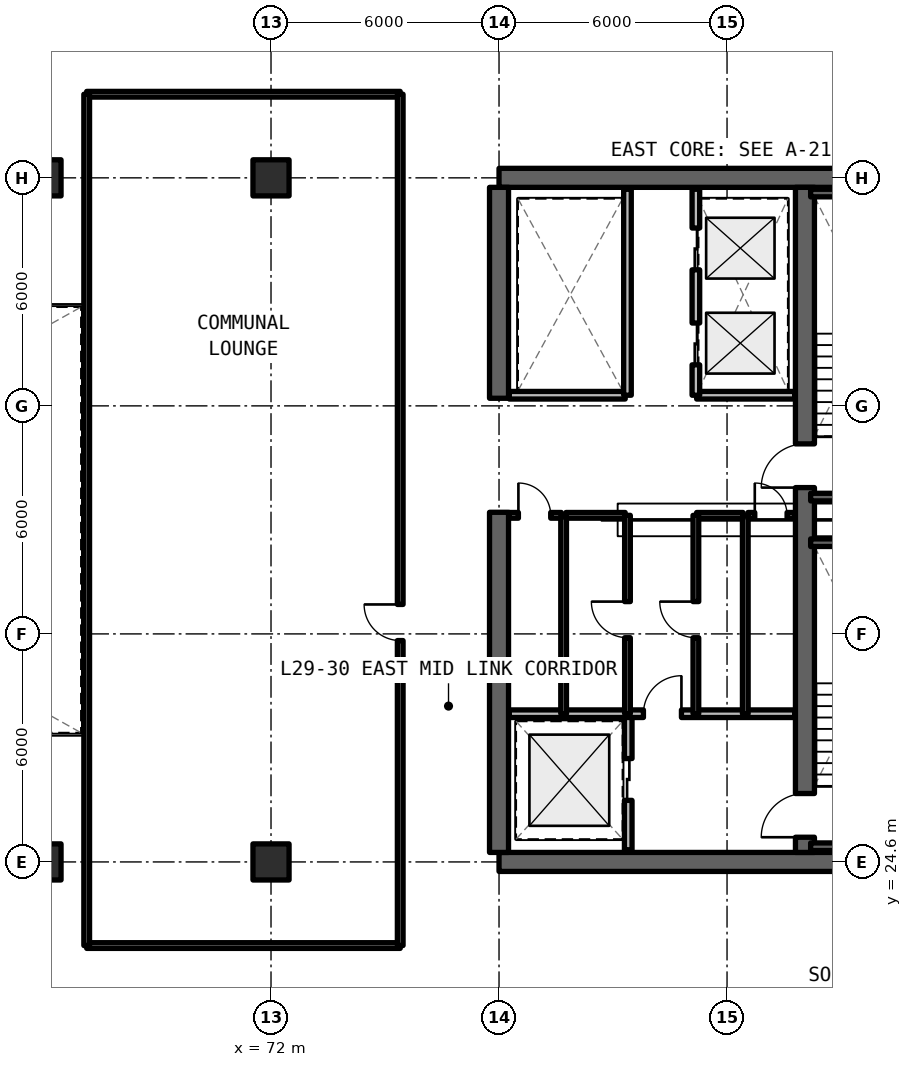
"""IFC4 building model, lengths in metres.
Left out: names, types, materials, properties, quantities, classifications, styles, units other than length and angle.
Written with IfcOpenShell. Run it as: python <this file> out.ifc"""

import sys

from ifc_helpers import new_model, si_unit, direction, frame, frame_2d, origin, origin_2d, place, context, subcontext, project, spatial, rectangle, extrude, element, fill, save


model = new_model("IFC4")
c1 = context("Model", 3, precision=1e-05, world=origin(), true_north=direction((0.0, 1.0)))
c2 = subcontext(c1, "Body", "Model", "MODEL_VIEW")
j1 = project(units=[si_unit("LENGTHUNIT", "METRE"), si_unit("PLANEANGLEUNIT", "RADIAN")], contexts=[c1])
p1 = place(None, origin())
s1 = spatial("IfcSite", under=j1, at=p1, CompositionType="ELEMENT")
p2 = place(p1, origin())
s2 = spatial("IfcBuilding", under=s1, at=p2, CompositionType="ELEMENT")
p3 = place(p2, frame((0.0, 0.0, 105.27)))
s3 = spatial("IfcBuildingStorey", under=s2, at=p3, CompositionType="ELEMENT", Elevation=105.27)
for number, where, z_axis, x_axis in (
    (1, (78.0, 24.6, 0.0), (0.0, 0.0, 1.0), (1.0, 0.0, 0.0)),
    (2, (90.0, 42.6, 0.0), (0.0, 0.0, 1.0), (-1.0, 0.0, 0.0)),
):
    element("IfcWall", number, at=place(p3, frame(where, z_axis=z_axis, x_axis=x_axis)), inside=s3, PredefinedType="SHEAR", context=c2, shape_type="SweptSolid", body=[
        extrude(rectangle(XDim=12.0, YDim=0.5, at=frame_2d((6.0, 0.0))), origin(), (0.0, 0.0, 1.0), 3.3),
    ])
p4 = place(p3, frame((78.0, 24.85, 0.0), z_axis=(0.0, 0.0, 1.0), x_axis=(0.0, 1.0, 0.0)))
e3 = element("IfcWall", 3, at=p4, inside=s3, PredefinedType="SHEAR", context=c2, shape_type="SweptSolid", body=[
    extrude(rectangle(XDim=8.95, YDim=0.5, at=frame_2d((4.475, 0.0))), origin(), (0.0, 0.0, 1.0), 3.3),
])
p5 = place(p3, frame((78.0, 36.8, 0.0), z_axis=(0.0, 0.0, 1.0), x_axis=(0.0, 1.0, 0.0)))
e4 = element("IfcWall", 4, at=p5, inside=s3, PredefinedType="SHEAR", context=c2, shape_type="SweptSolid", body=[
    extrude(rectangle(XDim=5.55, YDim=0.5, at=frame_2d((2.775, 0.0))), origin(), (0.0, 0.0, 1.0), 3.3),
])
p6 = place(p3, frame((86.05, 24.85, 0.0), z_axis=(0.0, 0.0, 1.0), x_axis=(0.0, 1.0, 0.0)))
e5 = element("IfcWall", 5, at=p6, inside=s3, PredefinedType="SHEAR", context=c2, shape_type="SweptSolid", body=[
    extrude(rectangle(XDim=17.5, YDim=0.5, at=frame_2d((8.75, 0.0))), origin(), (0.0, 0.0, 1.0), 3.3),
])
p7 = place(p6, frame((0.4, 0.0, 0.0)))
e6 = element("IfcOpeningElement", 6, at=p7, cuts=e5, PredefinedType="OPENING", context=c2, shape_type="SweptSolid", body=[
    extrude(rectangle(XDim=1.15, YDim=2.15, at=frame_2d((0.575, 1.075))), frame((0.0, 0.26, 0.0), z_axis=(0.0, -1.0, 0.0), x_axis=(1.0, 0.0, 0.0)), (0.0, 0.0, 1.0), 0.52),
])
p8 = place(p6, frame((9.6, 0.0, 0.0)))
e7 = element("IfcOpeningElement", 7, at=p8, cuts=e5, PredefinedType="OPENING", context=c2, shape_type="SweptSolid", body=[
    extrude(rectangle(XDim=1.15, YDim=2.15, at=frame_2d((0.575, 1.075))), frame((0.0, 0.26, 0.0), z_axis=(0.0, -1.0, 0.0), x_axis=(1.0, 0.0, 0.0)), (0.0, 0.0, 1.0), 0.52),
])
for number, where, z_axis, x_axis in (
    (8, (66.0, 24.6, 0.0), (0.0, 0.0, 1.0), (1.0, 0.0, 0.0)),
    (9, (66.0, 42.6, 0.0), (0.0, 0.0, 1.0), (1.0, 0.0, 0.0)),
    (10, (72.0, 24.6, 0.0), (0.0, 0.0, 1.0), (1.0, 0.0, 0.0)),
    (11, (72.0, 42.6, 0.0), (0.0, 0.0, 1.0), (1.0, 0.0, 0.0)),
):
    element("IfcColumn", number, at=place(p3, frame(where, z_axis=z_axis, x_axis=x_axis)), inside=s3, PredefinedType="COLUMN", context=c2, shape_type="SweptSolid", body=[
        extrude(rectangle(XDim=0.95, YDim=0.95, at=origin_2d()), origin(), (0.0, 0.0, 1.0), 3.3),
    ])
p9 = place(p3, frame((81.4, 24.92, 0.0), z_axis=(0.0, 0.0, 1.0), x_axis=(0.0, 1.0, 0.0)))
e12 = element("IfcWall", 12, at=p9, inside=s3, PredefinedType="SOLIDWALL", context=c2, shape_type="SweptSolid", body=[
    extrude(rectangle(XDim=3.58, YDim=0.2, at=frame_2d((1.79, 0.0))), origin(), (0.0, 0.0, 1.0), 2.35),
])
p10 = place(p9, frame((1.3, 0.0, 0.0)))
e13 = element("IfcOpeningElement", 13, at=p10, cuts=e12, PredefinedType="OPENING", context=c2, shape_type="SweptSolid", body=[
    extrude(rectangle(XDim=1.1, YDim=2.2, at=frame_2d((0.55, 1.1))), frame((0.0, 0.11, 0.0), z_axis=(0.0, -1.0, 0.0), x_axis=(1.0, 0.0, 0.0)), (0.0, 0.0, 1.0), 0.22),
])
p11 = place(p3, frame((78.27, 28.5, 0.0), z_axis=(0.0, 0.0, 1.0), x_axis=(1.0, 0.0, 0.0)))
e14 = element("IfcWall", 14, at=p11, inside=s3, PredefinedType="SOLIDWALL", context=c2, shape_type="SweptSolid", body=[
    extrude(rectangle(XDim=7.51, YDim=0.2, at=frame_2d((3.755, 0.0))), origin(), (0.0, 0.0, 1.0), 2.35),
])
p12 = place(p11, frame((3.53, 0.0, 0.0)))
e15 = element("IfcOpeningElement", 15, at=p12, cuts=e14, PredefinedType="OPENING", context=c2, shape_type="SweptSolid", body=[
    extrude(rectangle(XDim=1.0, YDim=2.15, at=frame_2d((0.5, 1.075))), frame((0.0, 0.11, 0.0), z_axis=(0.0, -1.0, 0.0), x_axis=(1.0, 0.0, 0.0)), (0.0, 0.0, 1.0), 0.22),
])
p13 = place(p3, frame((84.48, 28.5, 0.0), z_axis=(0.0, 0.0, 1.0), x_axis=(0.0, 1.0, 0.0)))
e16 = element("IfcWall", 16, at=p13, inside=s3, PredefinedType="SOLIDWALL", context=c2, shape_type="SweptSolid", body=[
    extrude(rectangle(XDim=5.22, YDim=0.15, at=frame_2d((2.61, 0.0))), origin(), (0.0, 0.0, 1.0), 2.35),
])
p14 = place(p3, frame((84.55, 33.72, 0.0), z_axis=(0.0, 0.0, 1.0), x_axis=(1.0, 0.0, 0.0)))
e17 = element("IfcWall", 17, at=p14, inside=s3, PredefinedType="SOLIDWALL", context=c2, shape_type="SweptSolid", body=[
    extrude(rectangle(XDim=1.23, YDim=0.15, at=frame_2d((0.615, 0.0))), origin(), (0.0, 0.0, 1.0), 2.35),
])
p15 = place(p14, frame((0.18, 0.0, 0.0)))
e18 = element("IfcOpeningElement", 18, at=p15, cuts=e17, PredefinedType="OPENING", context=c2, shape_type="SweptSolid", body=[
    extrude(rectangle(XDim=0.85, YDim=2.1, at=frame_2d((0.425, 1.05))), frame((0.0, 0.085, 0.0), z_axis=(0.0, -1.0, 0.0), x_axis=(1.0, 0.0, 0.0)), (0.0, 0.0, 1.0), 0.17),
])
p16 = place(p3, frame((83.2, 33.72, 0.0), z_axis=(0.0, 0.0, 1.0), x_axis=(1.0, 0.0, 0.0)))
e19 = element("IfcWall", 19, at=p16, inside=s3, PredefinedType="SOLIDWALL", context=c2, shape_type="SweptSolid", body=[
    extrude(rectangle(XDim=1.22, YDim=0.15, at=frame_2d((0.61, 0.0))), origin(), (0.0, 0.0, 1.0), 2.35),
])
p17 = place(p3, frame((83.18, 28.5, 0.0), z_axis=(0.0, 0.0, 1.0), x_axis=(0.0, 1.0, 0.0)))
e20 = element("IfcWall", 20, at=p17, inside=s3, PredefinedType="SOLIDWALL", context=c2, shape_type="SweptSolid", body=[
    extrude(rectangle(XDim=5.22, YDim=0.15, at=frame_2d((2.61, 0.0))), origin(), (0.0, 0.0, 1.0), 2.35),
])
p18 = place(p17, frame((2.0, 0.0, 0.0)))
e21 = element("IfcOpeningElement", 21, at=p18, cuts=e20, PredefinedType="OPENING", context=c2, shape_type="SweptSolid", body=[
    extrude(rectangle(XDim=0.95, YDim=2.15, at=frame_2d((0.475, 1.075))), frame((0.0, 0.085, 0.0), z_axis=(0.0, -1.0, 0.0), x_axis=(1.0, 0.0, 0.0)), (0.0, 0.0, 1.0), 0.17),
])
p19 = place(p3, frame((79.7, 28.5, 0.0), z_axis=(0.0, 0.0, 1.0), x_axis=(0.0, 1.0, 0.0)))
e22 = element("IfcWall", 22, at=p19, inside=s3, PredefinedType="SOLIDWALL", context=c2, shape_type="SweptSolid", body=[
    extrude(rectangle(XDim=5.22, YDim=0.15, at=frame_2d((2.61, 0.0))), origin(), (0.0, 0.0, 1.0), 2.35),
])
p20 = place(p3, frame((79.76, 33.72, 0.0), z_axis=(0.0, 0.0, 1.0), x_axis=(1.0, 0.0, 0.0)))
e23 = element("IfcWall", 23, at=p20, inside=s3, PredefinedType="SOLIDWALL", context=c2, shape_type="SweptSolid", body=[
    extrude(rectangle(XDim=1.56, YDim=0.15, at=frame_2d((0.78, 0.0))), origin(), (0.0, 0.0, 1.0), 2.35),
])
p21 = place(p3, frame((78.27, 33.72, 0.0), z_axis=(0.0, 0.0, 1.0), x_axis=(1.0, 0.0, 0.0)))
e24 = element("IfcWall", 24, at=p21, inside=s3, PredefinedType="SOLIDWALL", context=c2, shape_type="SweptSolid", body=[
    extrude(rectangle(XDim=1.37, YDim=0.15, at=frame_2d((0.685, 0.0))), origin(), (0.0, 0.0, 1.0), 2.35),
])
p22 = place(p21, frame((0.24, 0.0, 0.0)))
e25 = element("IfcOpeningElement", 25, at=p22, cuts=e24, PredefinedType="OPENING", context=c2, shape_type="SweptSolid", body=[
    extrude(rectangle(XDim=0.85, YDim=2.1, at=frame_2d((0.425, 1.05))), frame((0.0, 0.085, 0.0), z_axis=(0.0, -1.0, 0.0), x_axis=(1.0, 0.0, 0.0)), (0.0, 0.0, 1.0), 0.17),
])
p23 = place(p3, frame((81.38, 28.5, 0.0), z_axis=(0.0, 0.0, 1.0), x_axis=(0.0, 1.0, 0.0)))
e26 = element("IfcWall", 26, at=p23, inside=s3, PredefinedType="SOLIDWALL", context=c2, shape_type="SweptSolid", body=[
    extrude(rectangle(XDim=5.22, YDim=0.15, at=frame_2d((2.61, 0.0))), origin(), (0.0, 0.0, 1.0), 2.35),
])
p24 = place(p23, frame((2.0, 0.0, 0.0)))
e27 = element("IfcOpeningElement", 27, at=p24, cuts=e26, PredefinedType="OPENING", context=c2, shape_type="SweptSolid", body=[
    extrude(rectangle(XDim=0.95, YDim=2.15, at=frame_2d((0.475, 1.075))), frame((0.0, 0.085, 0.0), z_axis=(0.0, -1.0, 0.0), x_axis=(1.0, 0.0, 0.0)), (0.0, 0.0, 1.0), 0.17),
])
p25 = place(p3, frame((83.2, 36.88, 0.0), z_axis=(0.0, 0.0, 1.0), x_axis=(1.0, 0.0, 0.0)))
e28 = element("IfcWall", 28, at=p25, inside=s3, PredefinedType="SOLIDWALL", context=c2, shape_type="SweptSolid", body=[
    extrude(rectangle(XDim=2.58, YDim=0.2, at=frame_2d((1.29, 0.0))), origin(), (0.0, 0.0, 1.0), 2.35),
])
p26 = place(p3, frame((83.18, 36.88, 0.0), z_axis=(0.0, 0.0, 1.0), x_axis=(0.0, 1.0, 0.0)))
e29 = element("IfcWall", 29, at=p26, inside=s3, PredefinedType="SOLIDWALL", context=c2, shape_type="SweptSolid", body=[
    extrude(rectangle(XDim=5.42, YDim=0.2, at=frame_2d((2.71, 0.0))), origin(), (0.0, 0.0, 1.0), 2.35),
])
p27 = place(p26, frame((0.8, 0.0, 0.0)))
e30 = element("IfcOpeningElement", 30, at=p27, cuts=e29, PredefinedType="OPENING", context=c2, shape_type="SweptSolid", body=[
    extrude(rectangle(XDim=1.1, YDim=2.2, at=frame_2d((0.55, 1.1))), frame((0.0, 0.11, 0.0), z_axis=(0.0, -1.0, 0.0), x_axis=(1.0, 0.0, 0.0)), (0.0, 0.0, 1.0), 0.22),
])
p28 = place(p26, frame((3.3, 0.0, 0.0)))
e31 = element("IfcOpeningElement", 31, at=p28, cuts=e29, PredefinedType="OPENING", context=c2, shape_type="SweptSolid", body=[
    extrude(rectangle(XDim=1.1, YDim=2.2, at=frame_2d((0.55, 1.1))), frame((0.0, 0.11, 0.0), z_axis=(0.0, -1.0, 0.0), x_axis=(1.0, 0.0, 0.0)), (0.0, 0.0, 1.0), 0.22),
])
p29 = place(p3, frame((78.27, 36.88, 0.0), z_axis=(0.0, 0.0, 1.0), x_axis=(1.0, 0.0, 0.0)))
e32 = element("IfcWall", 32, at=p29, inside=s3, PredefinedType="SOLIDWALL", context=c2, shape_type="SweptSolid", body=[
    extrude(rectangle(XDim=3.05, YDim=0.2, at=frame_2d((1.525, 0.0))), origin(), (0.0, 0.0, 1.0), 2.35),
])
p30 = place(p3, frame((81.38, 36.88, 0.0), z_axis=(0.0, 0.0, 1.0), x_axis=(0.0, 1.0, 0.0)))
e33 = element("IfcWall", 33, at=p30, inside=s3, PredefinedType="SOLIDWALL", context=c2, shape_type="SweptSolid", body=[
    extrude(rectangle(XDim=5.42, YDim=0.2, at=frame_2d((2.71, 0.0))), origin(), (0.0, 0.0, 1.0), 2.35),
])
for number, where, z_axis, x_axis in (
    (34, (67.15, 22.4, 0.0), (0.0, 0.0, 1.0), (1.0, 0.0, 0.0)),
    (35, (67.15, 44.8, 0.0), (0.0, 0.0, 1.0), (1.0, 0.0, 0.0)),
):
    element("IfcWall", number, at=place(p3, frame(where, z_axis=z_axis, x_axis=x_axis)), inside=s3, PredefinedType="SOLIDWALL", context=c2, shape_type="SweptSolid", body=[
        extrude(rectangle(XDim=8.25, YDim=0.15, at=frame_2d((4.125, 0.0))), origin(), (0.0, 0.0, 1.0), 2.35),
    ])
p31 = place(p3, frame((67.15, 22.4, 0.0), z_axis=(0.0, 0.0, 1.0), x_axis=(0.0, 1.0, 0.0)))
e36 = element("IfcWall", 36, at=p31, inside=s3, PredefinedType="SOLIDWALL", context=c2, shape_type="SweptSolid", body=[
    extrude(rectangle(XDim=22.4, YDim=0.15, at=frame_2d((11.2, 0.0))), origin(), (0.0, 0.0, 1.0), 2.35),
])
p32 = place(p3, frame((75.4, 22.4, 0.0), z_axis=(0.0, 0.0, 1.0), x_axis=(0.0, 1.0, 0.0)))
e37 = element("IfcWall", 37, at=p32, inside=s3, PredefinedType="SOLIDWALL", context=c2, shape_type="SweptSolid", body=[
    extrude(rectangle(XDim=22.4, YDim=0.15, at=frame_2d((11.2, 0.0))), origin(), (0.0, 0.0, 1.0), 2.35),
])
p33 = place(p32, frame((8.025, 0.0, 0.0)))
e38 = element("IfcOpeningElement", 38, at=p33, cuts=e37, PredefinedType="OPENING", context=c2, shape_type="SweptSolid", body=[
    extrude(rectangle(XDim=0.95, YDim=2.15, at=frame_2d((0.475, 1.075))), frame((0.0, 0.085, 0.0), z_axis=(0.0, -1.0, 0.0), x_axis=(1.0, 0.0, 0.0)), (0.0, 0.0, 1.0), 0.17),
])
for number, where, z_axis, x_axis in (
    (39, (86.2, 25.0, 0.0), (0.0, 0.0, 1.0), (1.0, 0.0, 0.0)),
    (40, (89.6, 33.0, 0.0), (0.0, 0.0, 1.0), (-1.0, 0.0, 0.0)),
    (41, (86.2, 34.2, 0.0), (0.0, 0.0, 1.0), (1.0, 0.0, 0.0)),
    (42, (89.6, 42.2, 0.0), (0.0, 0.0, 1.0), (-1.0, 0.0, 0.0)),
):
    element("IfcWall", number, at=place(p3, frame(where, z_axis=z_axis, x_axis=x_axis)), inside=s3, PredefinedType="SOLIDWALL", context=c2, shape_type="SweptSolid", body=[
        extrude(rectangle(XDim=3.4, YDim=0.2, at=frame_2d((1.7, 0.0))), origin(), (0.0, 0.0, 1.0), 3.3),
    ])
p34 = place(p10, origin())
e43 = element("IfcDoor", 43, at=p34, inside=s3, OperationType="SLIDING_TO_LEFT", PredefinedType="DOOR", context=c2, shape_type="SweptSolid", body=[
    extrude(rectangle(XDim=1.1, YDim=2.2, at=frame_2d((0.55, 1.1))), frame((0.0, 0.025, 0.0), z_axis=(0.0, -1.0, 0.0), x_axis=(1.0, 0.0, 0.0)), (0.0, 0.0, 1.0), 0.05),
])
fill(e13, e43)
p35 = place(p12, origin())
e44 = element("IfcDoor", 44, at=p35, inside=s3, OperationType="SINGLE_SWING_RIGHT", PredefinedType="DOOR", context=c2, shape_type="SweptSolid", body=[
    extrude(rectangle(XDim=1.0, YDim=2.15, at=frame_2d((0.5, 1.075))), frame((0.0, 0.025, 0.0), z_axis=(0.0, -1.0, 0.0), x_axis=(1.0, 0.0, 0.0)), (0.0, 0.0, 1.0), 0.05),
])
fill(e15, e44)
p36 = place(p15, origin())
e45 = element("IfcDoor", 45, at=p36, inside=s3, OperationType="SINGLE_SWING_LEFT", PredefinedType="DOOR", context=c2, shape_type="SweptSolid", body=[
    extrude(rectangle(XDim=0.85, YDim=2.1, at=frame_2d((0.425, 1.05))), frame((0.0, 0.025, 0.0), z_axis=(0.0, -1.0, 0.0), x_axis=(1.0, 0.0, 0.0)), (0.0, 0.0, 1.0), 0.05),
])
fill(e18, e45)
p37 = place(p18, origin())
e46 = element("IfcDoor", 46, at=p37, inside=s3, OperationType="SINGLE_SWING_RIGHT", PredefinedType="DOOR", context=c2, shape_type="SweptSolid", body=[
    extrude(rectangle(XDim=0.95, YDim=2.15, at=frame_2d((0.475, 1.075))), frame((0.0, 0.025, 0.0), z_axis=(0.0, -1.0, 0.0), x_axis=(1.0, 0.0, 0.0)), (0.0, 0.0, 1.0), 0.05),
])
fill(e21, e46)
p38 = place(p22, origin())
e47 = element("IfcDoor", 47, at=p38, inside=s3, OperationType="SINGLE_SWING_LEFT", PredefinedType="DOOR", context=c2, shape_type="SweptSolid", body=[
    extrude(rectangle(XDim=0.85, YDim=2.1, at=frame_2d((0.425, 1.05))), frame((0.0, 0.025, 0.0), z_axis=(0.0, -1.0, 0.0), x_axis=(1.0, 0.0, 0.0)), (0.0, 0.0, 1.0), 0.05),
])
fill(e25, e47)
p39 = place(p24, origin())
e48 = element("IfcDoor", 48, at=p39, inside=s3, OperationType="SINGLE_SWING_RIGHT", PredefinedType="DOOR", context=c2, shape_type="SweptSolid", body=[
    extrude(rectangle(XDim=0.95, YDim=2.15, at=frame_2d((0.475, 1.075))), frame((0.0, 0.025, 0.0), z_axis=(0.0, -1.0, 0.0), x_axis=(1.0, 0.0, 0.0)), (0.0, 0.0, 1.0), 0.05),
])
fill(e27, e48)
p40 = place(p27, origin())
e49 = element("IfcDoor", 49, at=p40, inside=s3, OperationType="SLIDING_TO_LEFT", PredefinedType="DOOR", context=c2, shape_type="SweptSolid", body=[
    extrude(rectangle(XDim=1.1, YDim=2.2, at=frame_2d((0.55, 1.1))), frame((0.0, 0.025, 0.0), z_axis=(0.0, -1.0, 0.0), x_axis=(1.0, 0.0, 0.0)), (0.0, 0.0, 1.0), 0.05),
])
fill(e30, e49)
p41 = place(p28, origin())
e50 = element("IfcDoor", 50, at=p41, inside=s3, OperationType="SLIDING_TO_RIGHT", PredefinedType="DOOR", context=c2, shape_type="SweptSolid", body=[
    extrude(rectangle(XDim=1.1, YDim=2.2, at=frame_2d((0.55, 1.1))), frame((0.0, 0.025, 0.0), z_axis=(0.0, -1.0, 0.0), x_axis=(1.0, 0.0, 0.0)), (0.0, 0.0, 1.0), 0.05),
])
fill(e31, e50)
p42 = place(p33, origin())
e51 = element("IfcDoor", 51, at=p42, inside=s3, OperationType="SINGLE_SWING_RIGHT", PredefinedType="DOOR", context=c2, shape_type="SweptSolid", body=[
    extrude(rectangle(XDim=0.95, YDim=2.15, at=frame_2d((0.475, 1.075))), frame((0.0, 0.025, 0.0), z_axis=(0.0, -1.0, 0.0), x_axis=(1.0, 0.0, 0.0)), (0.0, 0.0, 1.0), 0.05),
])
fill(e38, e51)
p43 = place(p7, origin())
e52 = element("IfcDoor", 52, at=p43, inside=s3, OperationType="SINGLE_SWING_RIGHT", PredefinedType="DOOR", context=c2, shape_type="SweptSolid", body=[
    extrude(rectangle(XDim=1.15, YDim=2.15, at=frame_2d((0.575, 1.075))), frame((0.0, 0.025, 0.0), z_axis=(0.0, -1.0, 0.0), x_axis=(1.0, 0.0, 0.0)), (0.0, 0.0, 1.0), 0.05),
])
fill(e6, e52)
p44 = place(p8, origin())
e53 = element("IfcDoor", 53, at=p44, inside=s3, OperationType="SINGLE_SWING_LEFT", PredefinedType="DOOR", context=c2, shape_type="SweptSolid", body=[
    extrude(rectangle(XDim=1.15, YDim=2.15, at=frame_2d((0.575, 1.075))), frame((0.0, 0.025, 0.0), z_axis=(0.0, -1.0, 0.0), x_axis=(1.0, 0.0, 0.0)), (0.0, 0.0, 1.0), 0.05),
])
fill(e7, e53)
save(model, sys.argv[1])
